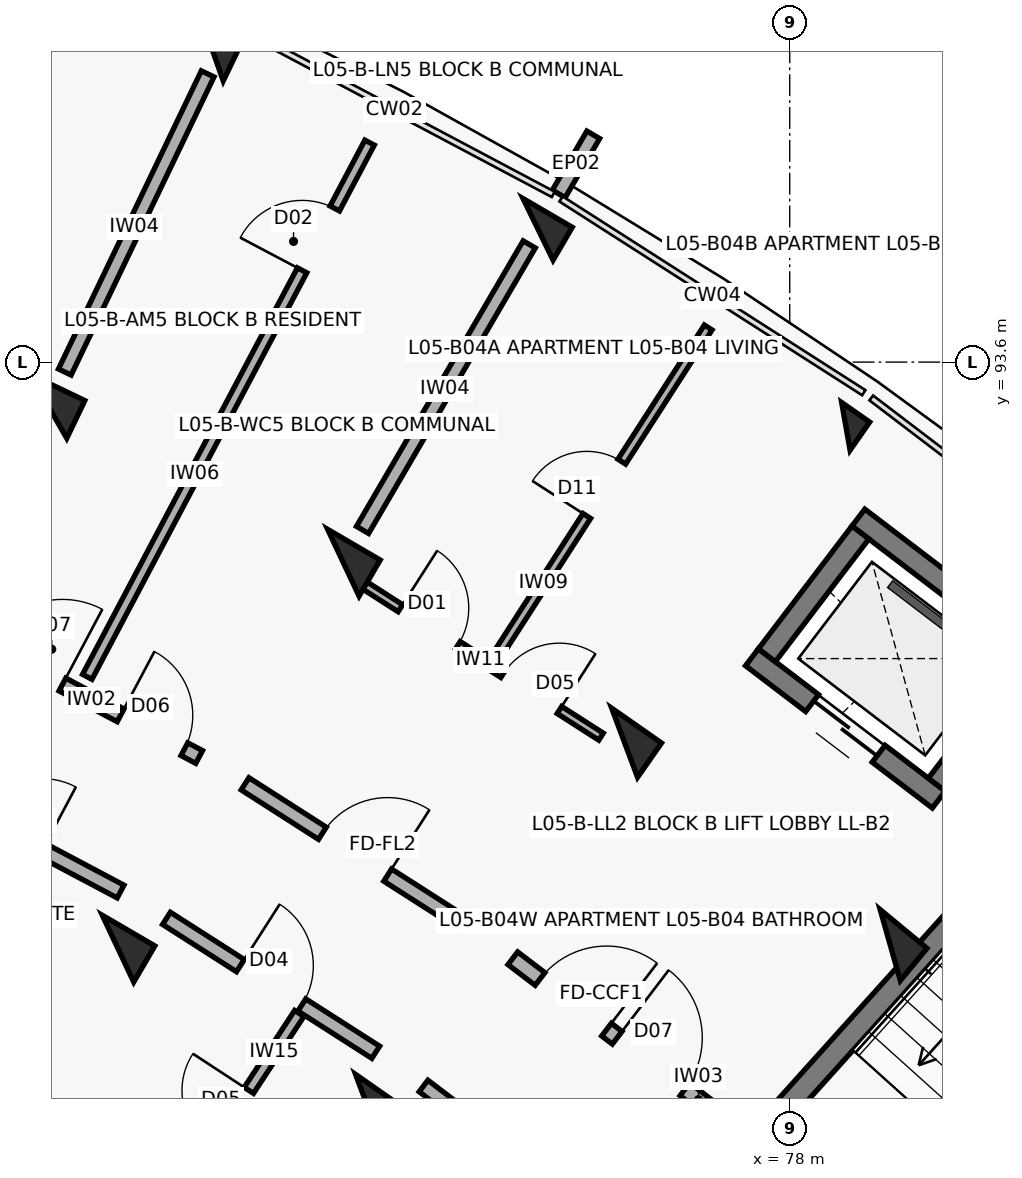
"""IFC4 building model, lengths in metres.
Left out: names, types, materials, properties, quantities, classifications, styles, units other than length and angle.
Written with IfcOpenShell. Run it as: python <this file> out.ifc"""

import sys

from ifc_helpers import new_model, si_unit, direction, frame, frame_2d, origin, origin_2d, place, context, subcontext, project, spatial, rectangle, extrude, element, fill, save


model = new_model("IFC4")
c1 = context("Model", 3, precision=1e-05, world=origin(), true_north=direction((0.0, 1.0)))
c2 = subcontext(c1, "Body", "Model", "MODEL_VIEW")
j1 = project(units=[si_unit("LENGTHUNIT", "METRE"), si_unit("PLANEANGLEUNIT", "RADIAN")], contexts=[c1])
p1 = place(None, origin())
s1 = spatial("IfcSite", under=j1, at=p1, CompositionType="ELEMENT")
p2 = place(p1, origin())
s2 = spatial("IfcBuilding", under=s1, at=p2, CompositionType="ELEMENT")
p3 = place(p2, frame((0.0, 0.0, 17.4)))
s3 = spatial("IfcBuildingStorey", under=s2, at=p3, CompositionType="ELEMENT", Elevation=17.4)
p4 = place(p3, frame((68.246, 93.019, 0.0), z_axis=(0.0, 0.0, 1.0), x_axis=(0.432085748802, 0.901832526405, 0.0)))
e1 = element("IfcColumn", 1, at=p4, inside=s3, PredefinedType="COLUMN", context=c2, shape_type="SweptSolid", body=[
    extrude(rectangle(XDim=0.55, YDim=0.8, at=origin_2d()), origin(), (0.0, 0.0, 1.0), 3.1),
])
p5 = place(p3, frame((70.441, 97.6, 0.0), z_axis=(0.0, 0.0, 1.0), x_axis=(0.432085748802, 0.901832526405, 0.0)))
e2 = element("IfcColumn", 2, at=p5, inside=s3, PredefinedType="COLUMN", context=c2, shape_type="SweptSolid", body=[
    extrude(rectangle(XDim=0.45, YDim=0.45, at=origin_2d()), origin(), (0.0, 0.0, 1.0), 3.1),
])
for number, where, z_axis, x_axis in (
    (3, (69.163, 85.882, 0.0), (0.0, 0.0, 1.0), (0.504, 0.864, 0.0)),
    (4, (72.127, 90.96, 0.0), (0.0, 0.0, 1.0), (0.504, 0.864, 0.0)),
):
    element("IfcColumn", number, at=place(p3, frame(where, z_axis=z_axis, x_axis=x_axis)), inside=s3, PredefinedType="COLUMN", context=c2, shape_type="SweptSolid", body=[
        extrude(rectangle(XDim=0.55, YDim=0.8, at=origin_2d()), origin(), (0.0, 0.0, 1.0), 3.1),
    ])
p6 = place(p3, frame((74.689, 95.347, 0.0), z_axis=(0.0, 0.0, 1.0), x_axis=(0.504226211181, 0.863571611366, 0.0)))
e5 = element("IfcColumn", 5, at=p6, inside=s3, PredefinedType="COLUMN", context=c2, shape_type="SweptSolid", body=[
    extrude(rectangle(XDim=0.5, YDim=0.75, at=origin_2d()), origin(), (0.0, 0.0, 1.0), 3.1),
])
for number, where, z_axis, x_axis in (
    (6, (72.458, 83.773, 0.0), (0.0, 0.0, 1.0), (0.573, 0.82, 0.0)),
    (7, (75.828, 88.592, 0.0), (0.0, 0.0, 1.0), (0.573, 0.82, 0.0)),
):
    element("IfcColumn", number, at=place(p3, frame(where, z_axis=z_axis, x_axis=x_axis)), inside=s3, PredefinedType="COLUMN", context=c2, shape_type="SweptSolid", body=[
        extrude(rectangle(XDim=0.55, YDim=0.8, at=origin_2d()), origin(), (0.0, 0.0, 1.0), 3.1),
    ])
p7 = place(p3, frame((78.739, 92.755, 0.0), z_axis=(0.0, 0.0, 1.0), x_axis=(0.573004420611, 0.819552276527, 0.0)))
e8 = element("IfcColumn", 8, at=p7, inside=s3, PredefinedType="COLUMN", context=c2, shape_type="SweptSolid", body=[
    extrude(rectangle(XDim=0.45, YDim=0.45, at=origin_2d()), origin(), (0.0, 0.0, 1.0), 3.1),
])
p8 = place(p3, frame((79.322, 85.93, 0.0), z_axis=(0.0, 0.0, 1.0), x_axis=(0.637961754089, 0.770068049148, 0.0)))
e9 = element("IfcColumn", 9, at=p8, inside=s3, PredefinedType="COLUMN", context=c2, shape_type="SweptSolid", body=[
    extrude(rectangle(XDim=0.55, YDim=0.8, at=origin_2d()), origin(), (0.0, 0.0, 1.0), 3.1),
])
p9 = place(p3, frame((74.961, 95.813, 0.0), z_axis=(0.0, 0.0, 1.0), x_axis=(0.504326383773, 0.863513114336, 0.0)))
e10 = element("IfcWall", 10, at=p9, inside=s3, PredefinedType="PARAPET", context=c2, shape_type="SweptSolid", body=[
    extrude(rectangle(XDim=0.9, YDim=0.195, at=frame_2d((0.45, 0.0))), origin(), (0.0, 0.0, 1.0), 2.25),
])
p10 = place(p3, frame((77.655, 83.461, 0.0), z_axis=(0.0, 0.0, 1.0), x_axis=(0.668868253964, 0.743380964808, 0.0)))
e11 = element("IfcWall", 11, at=p10, inside=s3, PredefinedType="SHEAR", context=c2, shape_type="SweptSolid", body=[
    extrude(rectangle(XDim=7.69, YDim=0.3, at=frame_2d((3.845, 0.0))), origin(), (0.0, 0.0, 1.0), 3.1),
])
p11 = place(p3, frame((79.961, 87.844, 0.0), z_axis=(0.0, 0.0, 1.0), x_axis=(-0.795464365424, 0.606000365793, 0.0)))
e12 = element("IfcWall", 12, at=p11, inside=s3, PredefinedType="SHEAR", context=c2, shape_type="SweptSolid", body=[
    extrude(rectangle(XDim=3.09, YDim=0.28, at=frame_2d((1.545, 0.0))), origin(), (0.0, 0.0, 1.0), 3.1),
])
p12 = place(p11, frame((0.995, 0.0, 0.0)))
e13 = element("IfcOpeningElement", 13, at=p12, cuts=e12, PredefinedType="OPENING", context=c2, shape_type="SweptSolid", body=[
    extrude(rectangle(XDim=1.1, YDim=2.15, at=frame_2d((0.55, 1.075))), frame((0.0, 0.15, 0.0), z_axis=(0.0, -1.0, 0.0), x_axis=(1.0, 0.0, 0.0)), (0.0, 0.0, 1.0), 0.3),
])
p13 = place(p3, frame((81.361, 89.681, 0.0), z_axis=(0.0, 0.0, 1.0), x_axis=(-0.795502452183, 0.605950368076, 0.0)))
e14 = element("IfcWall", 14, at=p13, inside=s3, PredefinedType="SHEAR", context=c2, shape_type="SweptSolid", body=[
    extrude(rectangle(XDim=3.09, YDim=0.28, at=frame_2d((1.545, 0.0))), origin(), (0.0, 0.0, 1.0), 3.1),
])
for number, where, z_axis, x_axis in (
    (15, (79.935, 88.04, 0.0), (0.0, 0.0, 1.0), (0.606, 0.795, 0.0)),
    (16, (77.699, 89.743, 0.0), (0.0, 0.0, 1.0), (0.606, 0.795, 0.0)),
):
    element("IfcWall", number, at=place(p3, frame(where, z_axis=z_axis, x_axis=x_axis)), inside=s3, PredefinedType="SHEAR", context=c2, shape_type="SweptSolid", body=[
        extrude(rectangle(XDim=2.03, YDim=0.28, at=frame_2d((1.015, 0.0))), origin(), (0.0, 0.0, 1.0), 3.1),
    ])
p14 = place(p3, frame((66.569, 94.06, 0.0), z_axis=(0.0, 0.0, 1.0), x_axis=(0.399048563147, 0.916929792433, 0.0)))
e17 = element("IfcWall", 17, at=p14, inside=s3, PredefinedType="PARTITIONING", context=c2, shape_type="SweptSolid", body=[
    extrude(rectangle(XDim=4.9, YDim=0.12, at=frame_2d((2.45, 0.0))), origin(), (0.0, 0.0, 1.0), 2.08),
])
p15 = place(p14, frame((1.98, 0.0, 0.0)))
e18 = element("IfcOpeningElement", 18, at=p15, cuts=e17, PredefinedType="OPENING", context=c2, shape_type="SweptSolid", body=[
    extrude(rectangle(XDim=0.94, YDim=2.1, at=frame_2d((0.47, 1.05))), frame((0.0, 0.07, 0.0), z_axis=(0.0, -1.0, 0.0), x_axis=(1.0, 0.0, 0.0)), (0.0, 0.0, 1.0), 0.14),
])
p16 = place(p3, frame((67.194, 90.014, 0.0), z_axis=(0.0, 0.0, 1.0), x_axis=(0.883410853063, -0.468599258099, 0.0)))
e19 = element("IfcWall", 19, at=p16, inside=s3, PredefinedType="SOLIDWALL", context=c2, shape_type="SweptSolid", body=[
    extrude(rectangle(XDim=3.436, YDim=0.19, at=frame_2d((1.718, 0.0))), origin(), (0.0, 0.0, 1.0), 2.08),
])
p17 = place(p16, frame((0.28, 0.0, 0.0)))
e20 = element("IfcOpeningElement", 20, at=p17, cuts=e19, PredefinedType="OPENING", context=c2, shape_type="SweptSolid", body=[
    extrude(rectangle(XDim=1.12, YDim=2.15, at=frame_2d((0.56, 1.075))), frame((0.0, 0.105, 0.0), z_axis=(0.0, -1.0, 0.0), x_axis=(1.0, 0.0, 0.0)), (0.0, 0.0, 1.0), 0.21),
])
p18 = place(p16, frame((2.266, 0.0, 0.0)))
e21 = element("IfcOpeningElement", 21, at=p18, cuts=e19, PredefinedType="OPENING", context=c2, shape_type="SweptSolid", body=[
    extrude(rectangle(XDim=0.95, YDim=2.1, at=frame_2d((0.475, 1.05))), frame((0.0, 0.105, 0.0), z_axis=(0.0, -1.0, 0.0), x_axis=(1.0, 0.0, 0.0)), (0.0, 0.0, 1.0), 0.21),
])
p19 = place(p3, frame((66.309, 88.165, 0.0), z_axis=(0.0, 0.0, 1.0), x_axis=(0.883444301944, -0.468536194293, 0.0)))
e22 = element("IfcWall", 22, at=p19, inside=s3, PredefinedType="SOLIDWALL", context=c2, shape_type="SweptSolid", body=[
    extrude(rectangle(XDim=3.269, YDim=0.19, at=frame_2d((1.634, 0.0))), origin(), (0.0, 0.0, 1.0), 2.08),
])
p20 = place(p19, frame((1.164, 0.0, 0.0)))
e23 = element("IfcOpeningElement", 23, at=p20, cuts=e22, PredefinedType="OPENING", context=c2, shape_type="SweptSolid", body=[
    extrude(rectangle(XDim=0.94, YDim=2.1, at=frame_2d((0.47, 1.05))), frame((0.0, 0.105, 0.0), z_axis=(0.0, -1.0, 0.0), x_axis=(1.0, 0.0, 0.0)), (0.0, 0.0, 1.0), 0.21),
])
p21 = place(p3, frame((68.758, 89.459, 0.0), z_axis=(0.0, 0.0, 1.0), x_axis=(0.467208910392, 0.884146952746, 0.0)))
e24 = element("IfcWall", 24, at=p21, inside=s3, PredefinedType="PARTITIONING", context=c2, shape_type="SweptSolid", body=[
    extrude(rectangle(XDim=7.95, YDim=0.14, at=frame_2d((3.975, 0.0))), origin(), (0.0, 0.0, 1.0), 2.08),
])
p22 = place(p21, frame((6.05, 0.0, 0.0)))
e25 = element("IfcOpeningElement", 25, at=p22, cuts=e24, PredefinedType="OPENING", context=c2, shape_type="SweptSolid", body=[
    extrude(rectangle(XDim=0.92, YDim=2.1, at=frame_2d((0.46, 1.05))), frame((0.0, 0.08, 0.0), z_axis=(0.0, -1.0, 0.0), x_axis=(1.0, 0.0, 0.0)), (0.0, 0.0, 1.0), 0.16),
])
p23 = place(p3, frame((68.462, 93.469, 0.0), z_axis=(0.0, 0.0, 1.0), x_axis=(0.432086898897, 0.901831975371, 0.0)))
e26 = element("IfcWall", 26, at=p23, inside=s3, PredefinedType="SOLIDWALL", context=c2, shape_type="SweptSolid", body=[
    extrude(rectangle(XDim=4.35, YDim=0.185, at=frame_2d((2.175, 0.0))), origin(), (0.0, 0.0, 1.0), 2.08),
])
p24 = place(p3, frame((70.834, 88.051, 0.0), z_axis=(0.0, 0.0, 1.0), x_axis=(0.842257205985, -0.539075874963, 0.0)))
e27 = element("IfcWall", 27, at=p24, inside=s3, PredefinedType="SOLIDWALL", context=c2, shape_type="SweptSolid", body=[
    extrude(rectangle(XDim=3.436, YDim=0.19, at=frame_2d((1.718, 0.0))), origin(), (0.0, 0.0, 1.0), 2.08),
])
p25 = place(p24, frame((1.208, 0.0, 0.0)))
e28 = element("IfcOpeningElement", 28, at=p25, cuts=e27, PredefinedType="OPENING", context=c2, shape_type="SweptSolid", body=[
    extrude(rectangle(XDim=1.02, YDim=2.15, at=frame_2d((0.51, 1.075))), frame((0.0, 0.105, 0.0), z_axis=(0.0, -1.0, 0.0), x_axis=(1.0, 0.0, 0.0)), (0.0, 0.0, 1.0), 0.21),
])
p26 = place(p3, frame((69.8, 86.281, 0.0), z_axis=(0.0, 0.0, 1.0), x_axis=(0.842225276846, -0.539125758095, 0.0)))
e29 = element("IfcWall", 29, at=p26, inside=s3, PredefinedType="SOLIDWALL", context=c2, shape_type="SweptSolid", body=[
    extrude(rectangle(XDim=3.269, YDim=0.19, at=frame_2d((1.634, 0.0))), origin(), (0.0, 0.0, 1.0), 2.08),
])
p27 = place(p26, frame((1.154, 0.0, 0.0)))
e30 = element("IfcOpeningElement", 30, at=p27, cuts=e29, PredefinedType="OPENING", context=c2, shape_type="SweptSolid", body=[
    extrude(rectangle(XDim=0.96, YDim=2.1, at=frame_2d((0.48, 1.05))), frame((0.0, 0.105, 0.0), z_axis=(0.0, -1.0, 0.0), x_axis=(1.0, 0.0, 0.0)), (0.0, 0.0, 1.0), 0.21),
])
p28 = place(p3, frame((69.739, 82.269, 0.0), z_axis=(0.0, 0.0, 1.0), x_axis=(0.547920940513, 0.836530120765, 0.0)))
e31 = element("IfcWall", 31, at=p28, inside=s3, PredefinedType="PARTITIONING", context=c2, shape_type="SweptSolid", body=[
    extrude(rectangle(XDim=3.3, YDim=0.145, at=frame_2d((1.65, 0.0))), origin(), (0.0, 0.0, 1.0), 2.08),
])
p29 = place(p28, frame((1.21, 0.0, 0.0)))
e32 = element("IfcOpeningElement", 32, at=p29, cuts=e31, PredefinedType="OPENING", context=c2, shape_type="SweptSolid", body=[
    extrude(rectangle(XDim=0.88, YDim=2.1, at=frame_2d((0.44, 1.05))), frame((0.0, 0.083, 0.0), z_axis=(0.0, -1.0, 0.0), x_axis=(1.0, 0.0, 0.0)), (0.0, 0.0, 1.0), 0.165),
])
p30 = place(p3, frame((72.33, 90.712, 0.0), z_axis=(0.0, 0.0, 1.0), x_axis=(0.842245628842, -0.539093962771, 0.0)))
e33 = element("IfcWall", 33, at=p30, inside=s3, PredefinedType="PARTITIONING", context=c2, shape_type="SweptSolid", body=[
    extrude(rectangle(XDim=3.785, YDim=0.11, at=frame_2d((1.893, 0.0))), origin(), (0.0, 0.0, 1.0), 2.08),
])
p31 = place(p30, frame((0.65, 0.0, 0.0)))
e34 = element("IfcOpeningElement", 34, at=p31, cuts=e33, PredefinedType="OPENING", context=c2, shape_type="SweptSolid", body=[
    extrude(rectangle(XDim=0.9, YDim=2.1, at=frame_2d((0.45, 1.05))), frame((0.0, 0.065, 0.0), z_axis=(0.0, -1.0, 0.0), x_axis=(1.0, 0.0, 0.0)), (0.0, 0.0, 1.0), 0.13),
])
p32 = place(p30, frame((2.255, 0.0, 0.0)))
e35 = element("IfcOpeningElement", 35, at=p32, cuts=e33, PredefinedType="OPENING", context=c2, shape_type="SweptSolid", body=[
    extrude(rectangle(XDim=0.88, YDim=2.1, at=frame_2d((0.44, 1.05))), frame((0.0, 0.065, 0.0), z_axis=(0.0, -1.0, 0.0), x_axis=(1.0, 0.0, 0.0)), (0.0, 0.0, 1.0), 0.13),
])
p33 = place(p3, frame((74.192, 89.81, 0.0), z_axis=(0.0, 0.0, 1.0), x_axis=(0.541612517702, 0.840628265447, 0.0)))
e36 = element("IfcWall", 36, at=p33, inside=s3, PredefinedType="PARTITIONING", context=c2, shape_type="SweptSolid", body=[
    extrude(rectangle(XDim=5.05, YDim=0.12, at=frame_2d((2.525, 0.0))), origin(), (0.0, 0.0, 1.0), 2.08),
])
p34 = place(p33, frame((2.1, 0.0, 0.0)))
e37 = element("IfcOpeningElement", 37, at=p34, cuts=e36, PredefinedType="OPENING", context=c2, shape_type="SweptSolid", body=[
    extrude(rectangle(XDim=0.85, YDim=2.1, at=frame_2d((0.425, 1.05))), frame((0.0, 0.07, 0.0), z_axis=(0.0, -1.0, 0.0), x_axis=(1.0, 0.0, 0.0)), (0.0, 0.0, 1.0), 0.14),
])
p35 = place(p3, frame((72.379, 91.392, 0.0), z_axis=(0.0, 0.0, 1.0), x_axis=(0.504216452091, 0.863577309475, 0.0)))
e38 = element("IfcWall", 38, at=p35, inside=s3, PredefinedType="SOLIDWALL", context=c2, shape_type="SweptSolid", body=[
    extrude(rectangle(XDim=4.35, YDim=0.185, at=frame_2d((2.175, 0.0))), origin(), (0.0, 0.0, 1.0), 2.08),
])
p36 = place(p3, frame((74.357, 85.756, 0.0), z_axis=(0.0, 0.0, 1.0), x_axis=(0.795498026433, -0.605956178235, 0.0)))
e39 = element("IfcWall", 39, at=p36, inside=s3, PredefinedType="SOLIDWALL", context=c2, shape_type="SweptSolid", body=[
    extrude(rectangle(XDim=3.296, YDim=0.21, at=frame_2d((1.648, 0.0))), origin(), (0.0, 0.0, 1.0), 2.08),
])
p37 = place(p36, frame((0.45, 0.0, 0.0)))
e40 = element("IfcOpeningElement", 40, at=p37, cuts=e39, PredefinedType="OPENING", context=c2, shape_type="SweptSolid", body=[
    extrude(rectangle(XDim=1.1, YDim=2.15, at=frame_2d((0.55, 1.075))), frame((0.0, 0.115, 0.0), z_axis=(0.0, -1.0, 0.0), x_axis=(1.0, 0.0, 0.0)), (0.0, 0.0, 1.0), 0.23),
])
p38 = place(p36, frame((1.726, 0.0, 0.0)))
e41 = element("IfcOpeningElement", 41, at=p38, cuts=e39, PredefinedType="OPENING", context=c2, shape_type="SweptSolid", body=[
    extrude(rectangle(XDim=1.12, YDim=2.15, at=frame_2d((0.56, 1.075))), frame((0.0, 0.115, 0.0), z_axis=(0.0, -1.0, 0.0), x_axis=(1.0, 0.0, 0.0)), (0.0, 0.0, 1.0), 0.23),
])
p39 = place(p3, frame((73.182, 84.076, 0.0), z_axis=(0.0, 0.0, 1.0), x_axis=(0.795501577908, -0.605951515838, 0.0)))
e42 = element("IfcWall", 42, at=p39, inside=s3, PredefinedType="SOLIDWALL", context=c2, shape_type="SweptSolid", body=[
    extrude(rectangle(XDim=3.129, YDim=0.19, at=frame_2d((1.564, 0.0))), origin(), (0.0, 0.0, 1.0), 2.08),
])
p40 = place(p39, frame((1.004, 0.0, 0.0)))
e43 = element("IfcOpeningElement", 43, at=p40, cuts=e42, PredefinedType="OPENING", context=c2, shape_type="SweptSolid", body=[
    extrude(rectangle(XDim=1.12, YDim=2.15, at=frame_2d((0.56, 1.075))), frame((0.0, 0.105, 0.0), z_axis=(0.0, -1.0, 0.0), x_axis=(1.0, 0.0, 0.0)), (0.0, 0.0, 1.0), 0.21),
])
p41 = place(p12, origin())
e44 = element("IfcDoor", 44, at=p41, inside=s3, OperationType="DOUBLE_DOOR_SLIDING", PredefinedType="DOOR", context=c2, shape_type="SweptSolid", body=[
    extrude(rectangle(XDim=1.1, YDim=2.15, at=frame_2d((0.55, 1.075))), frame((0.0, 0.025, 0.0), z_axis=(0.0, -1.0, 0.0), x_axis=(1.0, 0.0, 0.0)), (0.0, 0.0, 1.0), 0.05),
])
fill(e13, e44)
p42 = place(p17, origin())
e45 = element("IfcDoor", 45, at=p42, inside=s3, OperationType="SINGLE_SWING_RIGHT", PredefinedType="DOOR", context=c2, shape_type="SweptSolid", body=[
    extrude(rectangle(XDim=1.12, YDim=2.15, at=frame_2d((0.56, 1.075))), frame((0.0, 0.025, 0.0), z_axis=(0.0, -1.0, 0.0), x_axis=(1.0, 0.0, 0.0)), (0.0, 0.0, 1.0), 0.05),
])
fill(e20, e45)
p43 = place(p18, origin())
e46 = element("IfcDoor", 46, at=p43, inside=s3, OperationType="SINGLE_SWING_LEFT", PredefinedType="DOOR", context=c2, shape_type="SweptSolid", body=[
    extrude(rectangle(XDim=0.95, YDim=2.1, at=frame_2d((0.475, 1.05))), frame((0.0, 0.025, 0.0), z_axis=(0.0, -1.0, 0.0), x_axis=(1.0, 0.0, 0.0)), (0.0, 0.0, 1.0), 0.05),
])
fill(e21, e46)
p44 = place(p22, origin())
e47 = element("IfcDoor", 47, at=p44, inside=s3, OperationType="SINGLE_SWING_LEFT", PredefinedType="DOOR", context=c2, shape_type="SweptSolid", body=[
    extrude(rectangle(XDim=0.92, YDim=2.1, at=frame_2d((0.46, 1.05))), frame((0.0, 0.025, 0.0), z_axis=(0.0, -1.0, 0.0), x_axis=(1.0, 0.0, 0.0)), (0.0, 0.0, 1.0), 0.05),
])
fill(e25, e47)
p45 = place(p25, origin())
e48 = element("IfcDoor", 48, at=p45, inside=s3, OperationType="SINGLE_SWING_RIGHT", PredefinedType="DOOR", context=c2, shape_type="SweptSolid", body=[
    extrude(rectangle(XDim=1.02, YDim=2.15, at=frame_2d((0.51, 1.075))), frame((0.0, 0.025, 0.0), z_axis=(0.0, -1.0, 0.0), x_axis=(1.0, 0.0, 0.0)), (0.0, 0.0, 1.0), 0.05),
])
fill(e28, e48)
p46 = place(p27, origin())
e49 = element("IfcDoor", 49, at=p46, inside=s3, OperationType="SINGLE_SWING_LEFT", PredefinedType="DOOR", context=c2, shape_type="SweptSolid", body=[
    extrude(rectangle(XDim=0.96, YDim=2.1, at=frame_2d((0.48, 1.05))), frame((0.0, 0.025, 0.0), z_axis=(0.0, -1.0, 0.0), x_axis=(1.0, 0.0, 0.0)), (0.0, 0.0, 1.0), 0.05),
])
fill(e30, e49)
p47 = place(p29, origin())
e50 = element("IfcDoor", 50, at=p47, inside=s3, OperationType="SINGLE_SWING_RIGHT", PredefinedType="DOOR", context=c2, shape_type="SweptSolid", body=[
    extrude(rectangle(XDim=0.88, YDim=2.1, at=frame_2d((0.44, 1.05))), frame((0.0, 0.025, 0.0), z_axis=(0.0, -1.0, 0.0), x_axis=(1.0, 0.0, 0.0)), (0.0, 0.0, 1.0), 0.05),
])
fill(e32, e50)
p48 = place(p31, origin())
e51 = element("IfcDoor", 51, at=p48, inside=s3, OperationType="SINGLE_SWING_LEFT", PredefinedType="DOOR", context=c2, shape_type="SweptSolid", body=[
    extrude(rectangle(XDim=0.9, YDim=2.1, at=frame_2d((0.45, 1.05))), frame((0.0, 0.025, 0.0), z_axis=(0.0, -1.0, 0.0), x_axis=(1.0, 0.0, 0.0)), (0.0, 0.0, 1.0), 0.05),
])
fill(e34, e51)
p49 = place(p32, origin())
e52 = element("IfcDoor", 52, at=p49, inside=s3, OperationType="SINGLE_SWING_RIGHT", PredefinedType="DOOR", context=c2, shape_type="SweptSolid", body=[
    extrude(rectangle(XDim=0.88, YDim=2.1, at=frame_2d((0.44, 1.05))), frame((0.0, 0.025, 0.0), z_axis=(0.0, -1.0, 0.0), x_axis=(1.0, 0.0, 0.0)), (0.0, 0.0, 1.0), 0.05),
])
fill(e35, e52)
p50 = place(p34, origin())
e53 = element("IfcDoor", 53, at=p50, inside=s3, OperationType="SINGLE_SWING_LEFT", PredefinedType="DOOR", context=c2, shape_type="SweptSolid", body=[
    extrude(rectangle(XDim=0.85, YDim=2.1, at=frame_2d((0.425, 1.05))), frame((0.0, 0.025, 0.0), z_axis=(0.0, -1.0, 0.0), x_axis=(1.0, 0.0, 0.0)), (0.0, 0.0, 1.0), 0.05),
])
fill(e37, e53)
p51 = place(p37, origin())
e54 = element("IfcDoor", 54, at=p51, inside=s3, OperationType="SINGLE_SWING_RIGHT", PredefinedType="DOOR", context=c2, shape_type="SweptSolid", body=[
    extrude(rectangle(XDim=1.1, YDim=2.15, at=frame_2d((0.55, 1.075))), frame((0.0, 0.025, 0.0), z_axis=(0.0, -1.0, 0.0), x_axis=(1.0, 0.0, 0.0)), (0.0, 0.0, 1.0), 0.05),
])
fill(e40, e54)
p52 = place(p38, origin())
e55 = element("IfcDoor", 55, at=p52, inside=s3, OperationType="SINGLE_SWING_LEFT", PredefinedType="DOOR", context=c2, shape_type="SweptSolid", body=[
    extrude(rectangle(XDim=1.12, YDim=2.15, at=frame_2d((0.56, 1.075))), frame((0.0, 0.025, 0.0), z_axis=(0.0, -1.0, 0.0), x_axis=(1.0, 0.0, 0.0)), (0.0, 0.0, 1.0), 0.05),
])
fill(e41, e55)
save(model, sys.argv[1])
